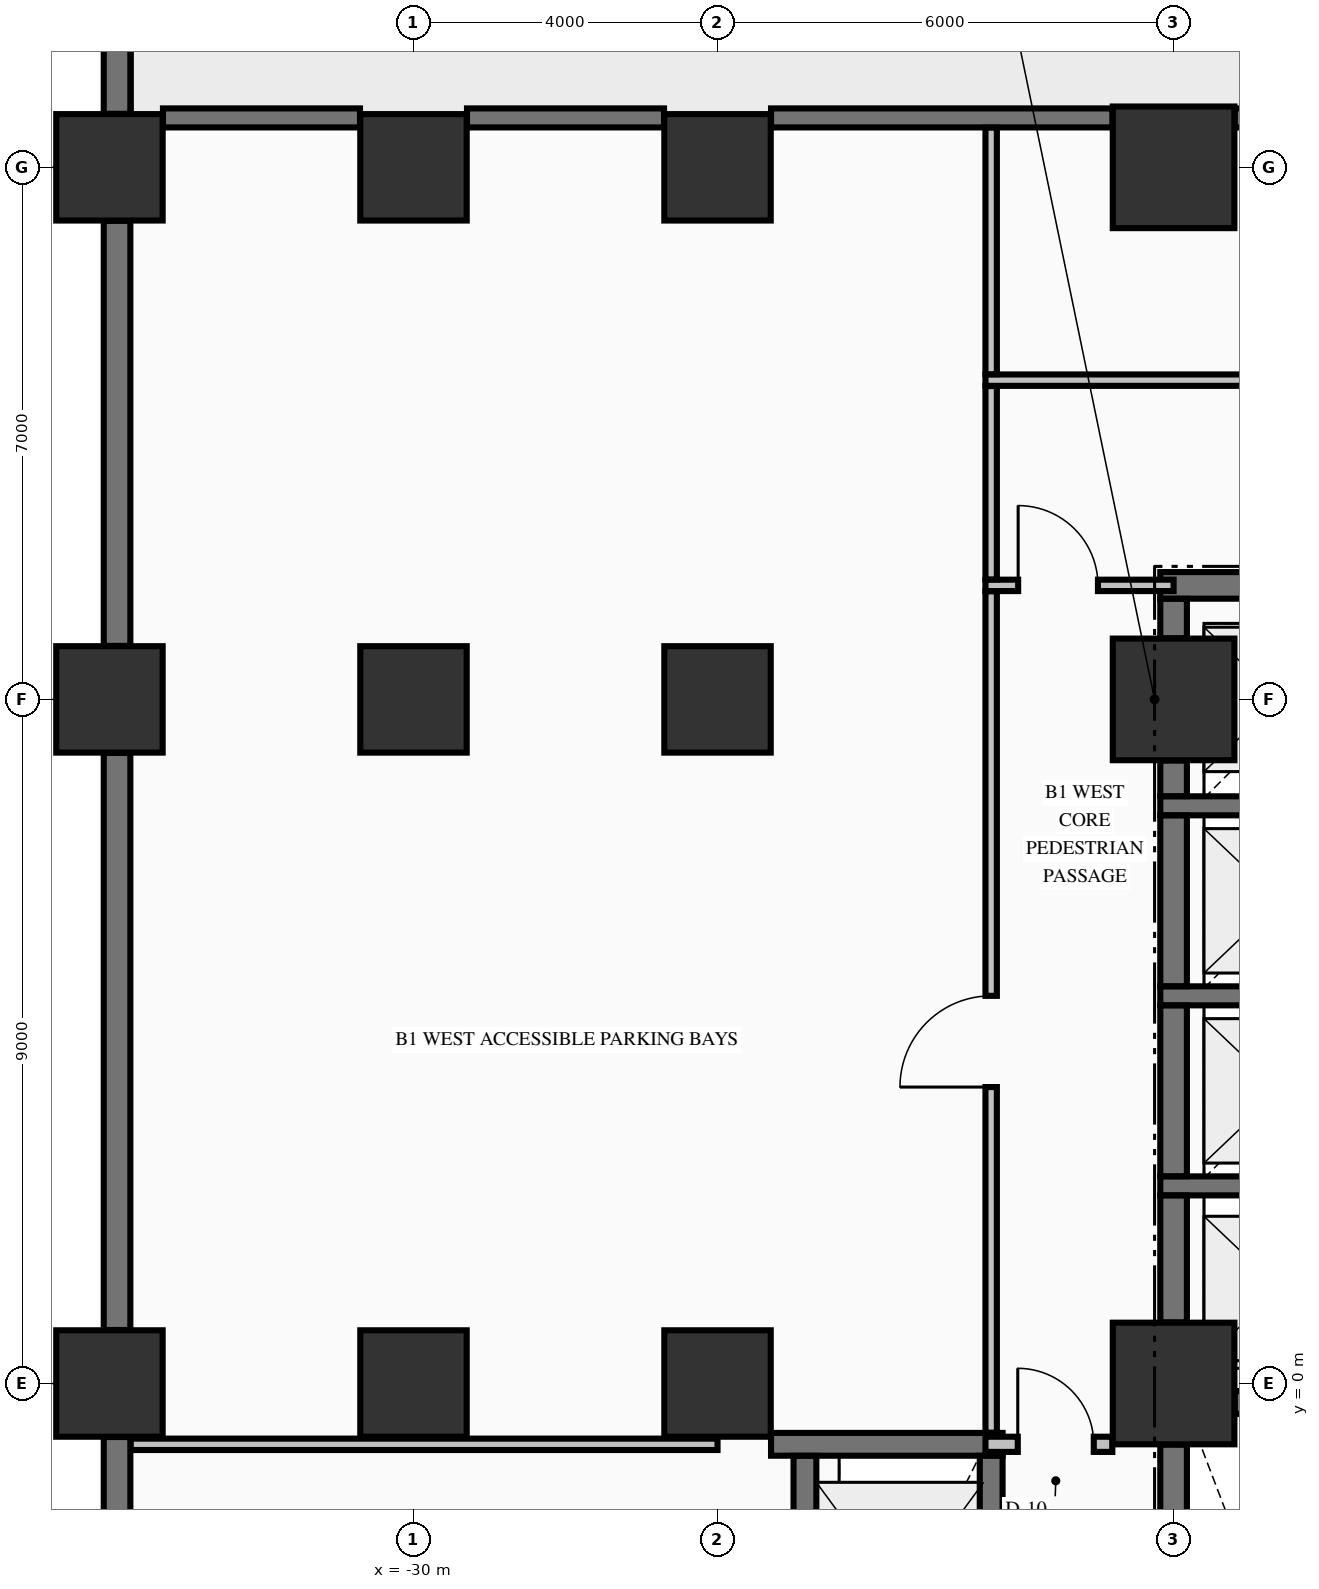
"""IFC4 building model, lengths in metres.
Left out: names, types, materials, properties, quantities, classifications, styles, units other than length and angle.
Written with IfcOpenShell. Run it as: python <this file> out.ifc"""

import sys

from ifc_helpers import new_model, si_unit, direction, frame, frame_2d, origin, origin_2d, place, context, subcontext, project, spatial, rectangle, extrude, element, fill, save


model = new_model("IFC4")
c1 = context("Model", 3, precision=1e-05, world=origin(), true_north=direction((0.0, 1.0)))
c2 = subcontext(c1, "Body", "Model", "MODEL_VIEW")
j1 = project(units=[si_unit("LENGTHUNIT", "METRE"), si_unit("PLANEANGLEUNIT", "RADIAN")], contexts=[c1])
p1 = place(None, origin())
s1 = spatial("IfcSite", under=j1, at=p1, CompositionType="ELEMENT")
p2 = place(p1, origin())
s2 = spatial("IfcBuilding", under=s1, at=p2, CompositionType="ELEMENT")
p3 = place(p2, frame((0.0, 0.0, -4.55)))
s3 = spatial("IfcBuildingStorey", under=s2, at=p3, CompositionType="ELEMENT", Elevation=-4.55)
for number, where, z_axis, x_axis in (
    (1, (-34.0, 0.0, 0.0), (0.0, 0.0, 1.0), (1.0, 0.0, 0.0)),
    (2, (-34.0, 9.0, 0.0), (0.0, 0.0, 1.0), (1.0, 0.0, 0.0)),
    (3, (-34.0, 16.0, 0.0), (0.0, 0.0, 1.0), (1.0, 0.0, 0.0)),
    (4, (-30.0, 0.0, 0.0), (0.0, 0.0, 1.0), (1.0, 0.0, 0.0)),
    (5, (-30.0, 9.0, 0.0), (0.0, 0.0, 1.0), (1.0, 0.0, 0.0)),
    (6, (-30.0, 16.0, 0.0), (0.0, 0.0, 1.0), (1.0, 0.0, 0.0)),
    (7, (-26.0, 0.0, 0.0), (0.0, 0.0, 1.0), (1.0, 0.0, 0.0)),
    (8, (-26.0, 9.0, 0.0), (0.0, 0.0, 1.0), (1.0, 0.0, 0.0)),
    (9, (-26.0, 16.0, 0.0), (0.0, 0.0, 1.0), (1.0, 0.0, 0.0)),
):
    element("IfcColumn", number, at=place(p3, frame(where, z_axis=z_axis, x_axis=x_axis)), inside=s3, PredefinedType="COLUMN", context=c2, shape_type="SweptSolid", body=[
        extrude(rectangle(XDim=1.4, YDim=1.4, at=origin_2d()), origin(), (0.0, 0.0, 1.0), 4.2),
    ])
for number, where, z_axis, x_axis in (
    (10, (-20.0, 0.0, 0.0), (0.0, 0.0, 1.0), (1.0, 0.0, 0.0)),
    (11, (-20.0, 9.0, 0.0), (0.0, 0.0, 1.0), (1.0, 0.0, 0.0)),
    (12, (-20.0, 16.0, 0.0), (0.0, 0.0, 1.0), (1.0, 0.0, 0.0)),
):
    element("IfcColumn", number, at=place(p3, frame(where, z_axis=z_axis, x_axis=x_axis)), inside=s3, PredefinedType="COLUMN", context=c2, shape_type="SweptSolid", body=[
        extrude(rectangle(XDim=1.6, YDim=1.6, at=origin_2d()), origin(), (0.0, 0.0, 1.0), 4.2),
    ])
p4 = place(p3, frame((-25.296, -0.8, 0.0), z_axis=(0.0, 0.0, 1.0), x_axis=(1.0, 0.0, 0.0)))
e13 = element("IfcWall", 13, at=p4, inside=s3, PredefinedType="SHEAR", context=c2, shape_type="SweptSolid", body=[
    extrude(rectangle(XDim=3.046, YDim=0.3, at=frame_2d((1.523, 0.0))), origin(), (0.0, 0.0, 1.0), 4.2),
])
p5 = place(p3, frame((-19.196, -0.25, 0.0), z_axis=(0.0, 0.0, 1.0), x_axis=(1.0, 0.0, 0.0)))
e14 = element("IfcWall", 14, at=p5, inside=s3, PredefinedType="SHEAR", context=c2, shape_type="SweptSolid", body=[
    extrude(rectangle(XDim=7.392, YDim=0.3, at=frame_2d((3.696, 0.0))), origin(), (0.0, 0.0, 1.0), 4.2),
])
p6 = place(p5, frame((5.496, 0.0, 0.0)))
e15 = element("IfcOpeningElement", 15, at=p6, cuts=e14, PredefinedType="OPENING", context=c2, shape_type="SweptSolid", body=[
    extrude(rectangle(XDim=1.1, YDim=2.15, at=frame_2d((0.55, 1.075))), frame((0.0, 0.16, 0.0), z_axis=(0.0, -1.0, 0.0), x_axis=(1.0, 0.0, 0.0)), (0.0, 0.0, 1.0), 0.32),
])
for number, where, z_axis, x_axis in (
    (16, (-20.175, 2.6, 0.0), (0.0, 0.0, 1.0), (1.0, 0.0, 0.0)),
    (17, (-20.175, 5.1, 0.0), (0.0, 0.0, 1.0), (1.0, 0.0, 0.0)),
    (18, (-20.175, 7.6, 0.0), (0.0, 0.0, 1.0), (1.0, 0.0, 0.0)),
):
    element("IfcWall", number, at=place(p3, frame(where, z_axis=z_axis, x_axis=x_axis)), inside=s3, PredefinedType="SOLIDWALL", context=c2, shape_type="SweptSolid", body=[
        extrude(rectangle(XDim=3.1, YDim=0.25, at=frame_2d((1.55, 0.0))), origin(), (0.0, 0.0, 1.0), 4.2),
    ])
p7 = place(p3, frame((-20.175, 10.5, 0.0), z_axis=(0.0, 0.0, 1.0), x_axis=(1.0, 0.0, 0.0)))
e19 = element("IfcWall", 19, at=p7, inside=s3, PredefinedType="SHEAR", context=c2, shape_type="SweptSolid", body=[
    extrude(rectangle(XDim=5.475, YDim=0.35, at=frame_2d((2.738, 0.0))), origin(), (0.0, 0.0, 1.0), 4.2),
])
p8 = place(p7, frame((3.575, 0.0, 0.0)))
e20 = element("IfcOpeningElement", 20, at=p8, cuts=e19, PredefinedType="OPENING", context=c2, shape_type="SweptSolid", body=[
    extrude(rectangle(XDim=1.2, YDim=2.15, at=frame_2d((0.6, 1.075))), frame((0.0, 0.185, 0.0), z_axis=(0.0, -1.0, 0.0), x_axis=(1.0, 0.0, 0.0)), (0.0, 0.0, 1.0), 0.37),
])
for number, where, z_axis, x_axis in (
    (21, (-33.296, 16.65, 0.0), (0.0, 0.0, 1.0), (1.0, 0.0, 0.0)),
    (22, (-29.296, 16.65, 0.0), (0.0, 0.0, 1.0), (1.0, 0.0, 0.0)),
):
    element("IfcWall", number, at=place(p3, frame(where, z_axis=z_axis, x_axis=x_axis)), inside=s3, PredefinedType="SOLIDWALL", context=c2, shape_type="SweptSolid", body=[
        extrude(rectangle(XDim=2.592, YDim=0.25, at=frame_2d((1.296, 0.0))), origin(), (0.0, 0.0, 1.0), 4.2),
    ])
p9 = place(p3, frame((-25.296, 16.65, 0.0), z_axis=(0.0, 0.0, 1.0), x_axis=(1.0, 0.0, 0.0)))
e23 = element("IfcWall", 23, at=p9, inside=s3, PredefinedType="SOLIDWALL", context=c2, shape_type="SweptSolid", body=[
    extrude(rectangle(XDim=4.492, YDim=0.25, at=frame_2d((2.246, 0.0))), origin(), (0.0, 0.0, 1.0), 4.2),
])
p10 = place(p3, frame((-19.196, 16.65, 0.0), z_axis=(0.0, 0.0, 1.0), x_axis=(1.0, 0.0, 0.0)))
e24 = element("IfcWall", 24, at=p10, inside=s3, PredefinedType="SOLIDWALL", context=c2, shape_type="SweptSolid", body=[
    extrude(rectangle(XDim=7.392, YDim=0.25, at=frame_2d((3.696, 0.0))), origin(), (0.0, 0.0, 1.0), 4.2),
])
p11 = place(p3, frame((-33.722, -0.8, 0.0), z_axis=(0.0, 0.0, 1.0), x_axis=(1.0, 0.0, 0.0)))
e25 = element("IfcWall", 25, at=p11, inside=s3, PredefinedType="PARTITIONING", context=c2, shape_type="SweptSolid", body=[
    extrude(rectangle(XDim=7.722, YDim=0.15, at=frame_2d((3.861, 0.0))), origin(), (0.0, 0.0, 1.0), 4.2),
])
p12 = place(p3, frame((-22.475, -0.8, 0.0), z_axis=(0.0, 0.0, 1.0), x_axis=(1.0, 0.0, 0.0)))
e26 = element("IfcWall", 26, at=p12, inside=s3, PredefinedType="PARTITIONING", context=c2, shape_type="SweptSolid", body=[
    extrude(rectangle(XDim=1.669, YDim=0.2, at=frame_2d((0.834, 0.0))), origin(), (0.0, 0.0, 1.0), 4.2),
])
p13 = place(p12, frame((0.425, 0.0, 0.0)))
e27 = element("IfcOpeningElement", 27, at=p13, cuts=e26, PredefinedType="OPENING", context=c2, shape_type="SweptSolid", body=[
    extrude(rectangle(XDim=1.0, YDim=2.15, at=frame_2d((0.5, 1.075))), frame((0.0, 0.11, 0.0), z_axis=(0.0, -1.0, 0.0), x_axis=(1.0, 0.0, 0.0)), (0.0, 0.0, 1.0), 0.22),
])
p14 = place(p3, frame((-22.475, 10.5, 0.0), z_axis=(0.0, 0.0, 1.0), x_axis=(1.0, 0.0, 0.0)))
e28 = element("IfcWall", 28, at=p14, inside=s3, PredefinedType="PARTITIONING", context=c2, shape_type="SweptSolid", body=[
    extrude(rectangle(XDim=2.475, YDim=0.15, at=frame_2d((1.238, 0.0))), origin(), (0.0, 0.0, 1.0), 4.2),
])
p15 = place(p14, frame((0.43, 0.0, 0.0)))
e29 = element("IfcOpeningElement", 29, at=p15, cuts=e28, PredefinedType="OPENING", context=c2, shape_type="SweptSolid", body=[
    extrude(rectangle(XDim=1.05, YDim=2.15, at=frame_2d((0.525, 1.075))), frame((0.0, 0.085, 0.0), z_axis=(0.0, -1.0, 0.0), x_axis=(1.0, 0.0, 0.0)), (0.0, 0.0, 1.0), 0.17),
])
p16 = place(p3, frame((-22.475, 13.2, 0.0), z_axis=(0.0, 0.0, 1.0), x_axis=(1.0, 0.0, 0.0)))
e30 = element("IfcWall", 30, at=p16, inside=s3, PredefinedType="PARTITIONING", context=c2, shape_type="SweptSolid", body=[
    extrude(rectangle(XDim=56.197, YDim=0.15, at=frame_2d((28.099, 0.0))), origin(), (0.0, 0.0, 1.0), 4.2),
])
p17 = place(p16, frame((43.125, 0.0, 0.0)))
e31 = element("IfcOpeningElement", 31, at=p17, cuts=e30, PredefinedType="OPENING", context=c2, shape_type="SweptSolid", body=[
    extrude(rectangle(XDim=1.1, YDim=2.15, at=frame_2d((0.55, 1.075))), frame((0.0, 0.085, 0.0), z_axis=(0.0, -1.0, 0.0), x_axis=(1.0, 0.0, 0.0)), (0.0, 0.0, 1.0), 0.17),
])
p18 = place(p16, frame((27.375, 0.0, 0.0)))
e32 = element("IfcOpeningElement", 32, at=p18, cuts=e30, PredefinedType="OPENING", context=c2, shape_type="SweptSolid", body=[
    extrude(rectangle(XDim=1.2, YDim=2.15, at=frame_2d((0.6, 1.075))), frame((0.0, 0.085, 0.0), z_axis=(0.0, -1.0, 0.0), x_axis=(1.0, 0.0, 0.0)), (0.0, 0.0, 1.0), 0.17),
])
p19 = place(p16, frame((46.375, 0.0, 0.0)))
e33 = element("IfcOpeningElement", 33, at=p19, cuts=e30, PredefinedType="OPENING", context=c2, shape_type="SweptSolid", body=[
    extrude(rectangle(XDim=1.2, YDim=2.15, at=frame_2d((0.6, 1.075))), frame((0.0, 0.085, 0.0), z_axis=(0.0, -1.0, 0.0), x_axis=(1.0, 0.0, 0.0)), (0.0, 0.0, 1.0), 0.17),
])
p20 = place(p16, frame((16.6, 0.0, 0.0)))
e34 = element("IfcOpeningElement", 34, at=p20, cuts=e30, PredefinedType="OPENING", context=c2, shape_type="SweptSolid", body=[
    extrude(rectangle(XDim=0.95, YDim=2.15, at=frame_2d((0.475, 1.075))), frame((0.0, 0.085, 0.0), z_axis=(0.0, -1.0, 0.0), x_axis=(1.0, 0.0, 0.0)), (0.0, 0.0, 1.0), 0.17),
])
for number, where, z_axis, x_axis in (
    (35, (-33.9, -8.296, 0.0), (0.0, 0.0, 1.0), (0.0, 1.0, 0.0)),
    (36, (-33.9, 0.704, 0.0), (0.0, 0.0, 1.0), (0.0, 1.0, 0.0)),
):
    element("IfcWall", number, at=place(p3, frame(where, z_axis=z_axis, x_axis=x_axis)), inside=s3, PredefinedType="SHEAR", context=c2, shape_type="SweptSolid", body=[
        extrude(rectangle(XDim=7.592, YDim=0.35, at=frame_2d((3.796, 0.0))), origin(), (0.0, 0.0, 1.0), 4.2),
    ])
p21 = place(p3, frame((-33.9, 9.704, 0.0), z_axis=(0.0, 0.0, 1.0), x_axis=(0.0, 1.0, 0.0)))
e37 = element("IfcWall", 37, at=p21, inside=s3, PredefinedType="SHEAR", context=c2, shape_type="SweptSolid", body=[
    extrude(rectangle(XDim=5.592, YDim=0.35, at=frame_2d((2.796, 0.0))), origin(), (0.0, 0.0, 1.0), 4.2),
])
p22 = place(p3, frame((-33.9, 16.704, 0.0), z_axis=(0.0, 0.0, 1.0), x_axis=(0.0, 1.0, 0.0)))
e38 = element("IfcWall", 38, at=p22, inside=s3, PredefinedType="SHEAR", context=c2, shape_type="SweptSolid", body=[
    extrude(rectangle(XDim=4.592, YDim=0.35, at=frame_2d((2.296, 0.0))), origin(), (0.0, 0.0, 1.0), 4.2),
])
p23 = place(p3, frame((-24.85, -4.648, 0.0), z_axis=(0.0, 0.0, 1.0), x_axis=(0.0, 1.0, 0.0)))
e39 = element("IfcWall", 39, at=p23, inside=s3, PredefinedType="SHEAR", context=c2, shape_type="SweptSolid", body=[
    extrude(rectangle(XDim=3.696, YDim=0.3, at=frame_2d((1.848, 0.0))), origin(), (0.0, 0.0, 1.0), 4.2),
])
p24 = place(p3, frame((-22.4, -4.648, 0.0), z_axis=(0.0, 0.0, 1.0), x_axis=(0.0, 1.0, 0.0)))
e40 = element("IfcWall", 40, at=p24, inside=s3, PredefinedType="SHEAR", context=c2, shape_type="SweptSolid", body=[
    extrude(rectangle(XDim=3.696, YDim=0.3, at=frame_2d((1.848, 0.0))), origin(), (0.0, 0.0, 1.0), 4.2),
])
p25 = place(p24, frame((1.198, 0.0, 0.0)))
e41 = element("IfcOpeningElement", 41, at=p25, cuts=e40, PredefinedType="OPENING", context=c2, shape_type="SweptSolid", body=[
    extrude(rectangle(XDim=1.3, YDim=2.3, at=frame_2d((0.65, 1.15))), frame((0.0, 0.16, 0.0), z_axis=(0.0, -1.0, 0.0), x_axis=(1.0, 0.0, 0.0)), (0.0, 0.0, 1.0), 0.32),
])
p26 = place(p3, frame((-20.0, -8.196, 0.0), z_axis=(0.0, 0.0, 1.0), x_axis=(0.0, 1.0, 0.0)))
e42 = element("IfcWall", 42, at=p26, inside=s3, PredefinedType="SHEAR", context=c2, shape_type="SweptSolid", body=[
    extrude(rectangle(XDim=7.392, YDim=0.35, at=frame_2d((3.696, 0.0))), origin(), (0.0, 0.0, 1.0), 4.2),
])
p27 = place(p3, frame((-20.0, 0.804, 0.0), z_axis=(0.0, 0.0, 1.0), x_axis=(0.0, 1.0, 0.0)))
e43 = element("IfcWall", 43, at=p27, inside=s3, PredefinedType="SHEAR", context=c2, shape_type="SweptSolid", body=[
    extrude(rectangle(XDim=1.669, YDim=0.35, at=frame_2d((0.834, 0.0))), origin(), (0.0, 0.0, 1.0), 4.2),
])
for number, where, z_axis, x_axis in (
    (44, (-20.0, 2.727, 0.0), (0.0, 0.0, 1.0), (0.0, 1.0, 0.0)),
    (45, (-20.0, 5.227, 0.0), (0.0, 0.0, 1.0), (0.0, 1.0, 0.0)),
):
    element("IfcWall", number, at=place(p3, frame(where, z_axis=z_axis, x_axis=x_axis)), inside=s3, PredefinedType="SHEAR", context=c2, shape_type="SweptSolid", body=[
        extrude(rectangle(XDim=2.246, YDim=0.35, at=frame_2d((1.123, 0.0))), origin(), (0.0, 0.0, 1.0), 4.2),
    ])
p28 = place(p3, frame((-20.0, 7.727, 0.0), z_axis=(0.0, 0.0, 1.0), x_axis=(0.0, 1.0, 0.0)))
e46 = element("IfcWall", 46, at=p28, inside=s3, PredefinedType="SHEAR", context=c2, shape_type="SweptSolid", body=[
    extrude(rectangle(XDim=0.469, YDim=0.35, at=frame_2d((0.234, 0.0))), origin(), (0.0, 0.0, 1.0), 4.2),
])
p29 = place(p3, frame((-20.0, 9.804, 0.0), z_axis=(0.0, 0.0, 1.0), x_axis=(0.0, 1.0, 0.0)))
e47 = element("IfcWall", 47, at=p29, inside=s3, PredefinedType="SHEAR", context=c2, shape_type="SweptSolid", body=[
    extrude(rectangle(XDim=0.519, YDim=0.35, at=frame_2d((0.26, 0.0))), origin(), (0.0, 0.0, 1.0), 4.2),
])
p30 = place(p3, frame((-22.4, -0.647, 0.0), z_axis=(0.0, 0.0, 1.0), x_axis=(0.0, 1.0, 0.0)))
e48 = element("IfcWall", 48, at=p30, inside=s3, PredefinedType="PARTITIONING", context=c2, shape_type="SweptSolid", body=[
    extrude(rectangle(XDim=11.069, YDim=0.15, at=frame_2d((5.535, 0.0))), origin(), (0.0, 0.0, 1.0), 4.2),
])
p31 = place(p30, frame((4.547, 0.0, 0.0)))
e49 = element("IfcOpeningElement", 49, at=p31, cuts=e48, PredefinedType="OPENING", context=c2, shape_type="SweptSolid", body=[
    extrude(rectangle(XDim=1.2, YDim=2.15, at=frame_2d((0.6, 1.075))), frame((0.0, 0.085, 0.0), z_axis=(0.0, -1.0, 0.0), x_axis=(1.0, 0.0, 0.0)), (0.0, 0.0, 1.0), 0.17),
])
p32 = place(p3, frame((-22.4, 10.578, 0.0), z_axis=(0.0, 0.0, 1.0), x_axis=(0.0, 1.0, 0.0)))
e50 = element("IfcWall", 50, at=p32, inside=s3, PredefinedType="PARTITIONING", context=c2, shape_type="SweptSolid", body=[
    extrude(rectangle(XDim=2.544, YDim=0.15, at=frame_2d((1.272, 0.0))), origin(), (0.0, 0.0, 1.0), 4.2),
])
p33 = place(p3, frame((-22.4, 13.278, 0.0), z_axis=(0.0, 0.0, 1.0), x_axis=(0.0, 1.0, 0.0)))
e51 = element("IfcWall", 51, at=p33, inside=s3, PredefinedType="PARTITIONING", context=c2, shape_type="SweptSolid", body=[
    extrude(rectangle(XDim=3.244, YDim=0.15, at=frame_2d((1.622, 0.0))), origin(), (0.0, 0.0, 1.0), 4.2),
])
p34 = place(p13, origin())
e52 = element("IfcDoor", 52, at=p34, inside=s3, OperationType="SINGLE_SWING_LEFT", PredefinedType="DOOR", context=c2, shape_type="SweptSolid", body=[
    extrude(rectangle(XDim=1.0, YDim=2.15, at=frame_2d((0.5, 1.075))), frame((0.0, 0.025, 0.0), z_axis=(0.0, -1.0, 0.0), x_axis=(1.0, 0.0, 0.0)), (0.0, 0.0, 1.0), 0.05),
])
fill(e27, e52)
p35 = place(p15, origin())
e53 = element("IfcDoor", 53, at=p35, inside=s3, OperationType="SINGLE_SWING_LEFT", PredefinedType="DOOR", context=c2, shape_type="SweptSolid", body=[
    extrude(rectangle(XDim=1.05, YDim=2.15, at=frame_2d((0.525, 1.075))), frame((0.0, 0.025, 0.0), z_axis=(0.0, -1.0, 0.0), x_axis=(1.0, 0.0, 0.0)), (0.0, 0.0, 1.0), 0.05),
])
fill(e29, e53)
p36 = place(p31, origin())
e54 = element("IfcDoor", 54, at=p36, inside=s3, OperationType="SINGLE_SWING_LEFT", PredefinedType="DOOR", context=c2, shape_type="SweptSolid", body=[
    extrude(rectangle(XDim=1.2, YDim=2.15, at=frame_2d((0.6, 1.075))), frame((0.0, 0.025, 0.0), z_axis=(0.0, -1.0, 0.0), x_axis=(1.0, 0.0, 0.0)), (0.0, 0.0, 1.0), 0.05),
])
fill(e49, e54)
save(model, sys.argv[1])
